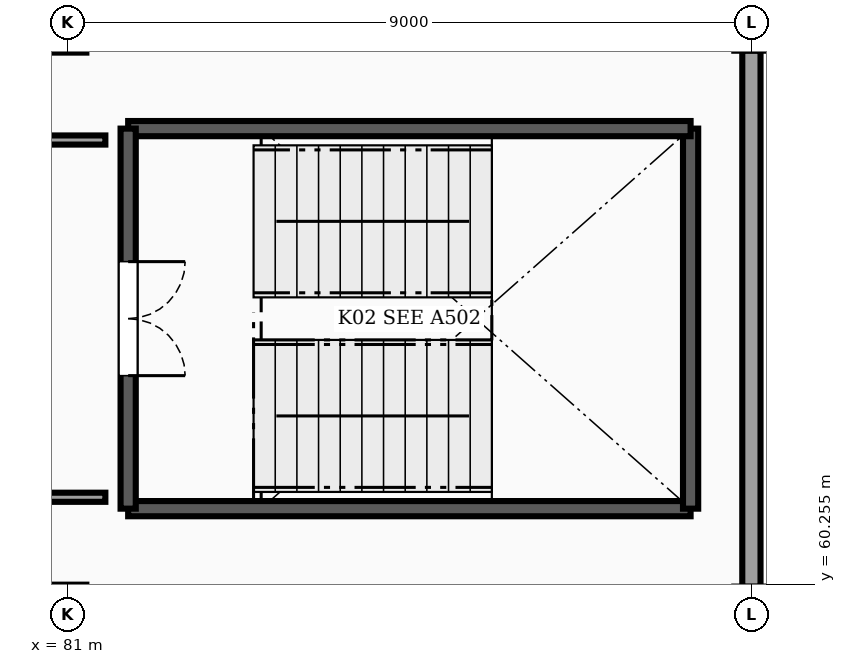
"""IFC4 building model, lengths in metres.
Left out: names, types, materials, properties, quantities, classifications, styles, units other than length and angle.
Written with IfcOpenShell. Run it as: python <this file> out.ifc"""

import sys

from ifc_helpers import new_model, si_unit, direction, frame, frame_2d, origin, place, context, subcontext, project, spatial, rectangle, extrude, element, fill, save


model = new_model("IFC4")
c1 = context("Model", 3, precision=1e-05, world=origin(), true_north=direction((0.0, 1.0)))
c2 = subcontext(c1, "Body", "Model", "MODEL_VIEW")
j1 = project(units=[si_unit("LENGTHUNIT", "METRE"), si_unit("PLANEANGLEUNIT", "RADIAN")], contexts=[c1])
p1 = place(None, origin())
s1 = spatial("IfcSite", under=j1, at=p1, CompositionType="ELEMENT")
p2 = place(p1, origin())
s2 = spatial("IfcBuilding", under=s1, at=p2, CompositionType="ELEMENT")
p3 = place(p2, frame((0.0, 0.0, 8.5)))
s3 = spatial("IfcBuildingStorey", under=s2, at=p3, CompositionType="ELEMENT", Elevation=8.5)
p4 = place(p3, frame((90.0, 67.279, 0.0), z_axis=(0.0, 0.0, 1.0), x_axis=(0.0, -1.0, 0.0)))
e1 = element("IfcWall", 1, at=p4, inside=s3, PredefinedType="SOLIDWALL", context=c2, shape_type="SweptSolid", body=[
    extrude(rectangle(XDim=7.058, YDim=0.24, at=frame_2d((3.529, 0.0))), origin(), (0.0, 0.0, 1.0), 2.977),
])
p5 = place(p3, frame((81.8, 61.25, 0.0), z_axis=(0.0, 0.0, 1.0), x_axis=(1.0, 0.0, 0.0)))
e2 = element("IfcWall", 2, at=p5, inside=s3, PredefinedType="SHEAR", context=c2, shape_type="SweptSolid", body=[
    extrude(rectangle(XDim=7.4, YDim=0.2, at=frame_2d((3.7, 0.0))), origin(), (0.0, 0.0, 1.0), 3.57),
])
p6 = place(p3, frame((89.2, 61.25, 0.0), z_axis=(0.0, 0.0, 1.0), x_axis=(0.0, 1.0, 0.0)))
e3 = element("IfcWall", 3, at=p6, inside=s3, PredefinedType="SHEAR", context=c2, shape_type="SweptSolid", body=[
    extrude(rectangle(XDim=5.0, YDim=0.2, at=frame_2d((2.5, 0.0))), origin(), (0.0, 0.0, 1.0), 3.57),
])
p7 = place(p3, frame((89.2, 66.25, 0.0), z_axis=(0.0, 0.0, 1.0), x_axis=(-1.0, 0.0, 0.0)))
e4 = element("IfcWall", 4, at=p7, inside=s3, PredefinedType="SHEAR", context=c2, shape_type="SweptSolid", body=[
    extrude(rectangle(XDim=7.4, YDim=0.2, at=frame_2d((3.7, 0.0))), origin(), (0.0, 0.0, 1.0), 3.57),
])
p8 = place(p3, frame((81.8, 66.25, 0.0), z_axis=(0.0, 0.0, 1.0), x_axis=(0.0, -1.0, 0.0)))
e5 = element("IfcWall", 5, at=p8, inside=s3, PredefinedType="SHEAR", context=c2, shape_type="SweptSolid", body=[
    extrude(rectangle(XDim=5.0, YDim=0.2, at=frame_2d((2.5, 0.0))), origin(), (0.0, 0.0, 1.0), 3.57),
])
p9 = place(p8, frame((1.75, 0.0, 0.0)))
e6 = element("IfcOpeningElement", 6, at=p9, cuts=e5, PredefinedType="OPENING", context=c2, shape_type="SweptSolid", body=[
    extrude(rectangle(XDim=1.5, YDim=2.15, at=frame_2d((0.75, 1.075))), frame((0.0, 0.11, 0.0), z_axis=(0.0, -1.0, 0.0), x_axis=(1.0, 0.0, 0.0)), (0.0, 0.0, 1.0), 0.22),
])
for number, where, z_axis, x_axis in (
    (7, (81.5, 61.4, 0.0), (0.0, 0.0, 1.0), (-1.0, 0.0, 0.0)),
    (8, (78.16, 66.1, 0.0), (0.0, 0.0, 1.0), (1.0, 0.0, 0.0)),
):
    element("IfcWall", number, at=place(p3, frame(where, z_axis=z_axis, x_axis=x_axis)), inside=s3, PredefinedType="PARTITIONING", context=c2, shape_type="SweptSolid", body=[
        extrude(rectangle(XDim=3.34, YDim=0.12, at=frame_2d((1.67, 0.0))), origin(), (0.0, 0.0, 1.0), 3.57),
    ])
p10 = place(p9, origin())
e9 = element("IfcDoor", 9, at=p10, inside=s3, OperationType="DOUBLE_DOOR_SINGLE_SWING", PredefinedType="DOOR", context=c2, shape_type="SweptSolid", body=[
    extrude(rectangle(XDim=1.5, YDim=2.15, at=frame_2d((0.75, 1.075))), frame((0.0, 0.025, 0.0), z_axis=(0.0, -1.0, 0.0), x_axis=(1.0, 0.0, 0.0)), (0.0, 0.0, 1.0), 0.05),
])
fill(e6, e9)
save(model, sys.argv[1])
